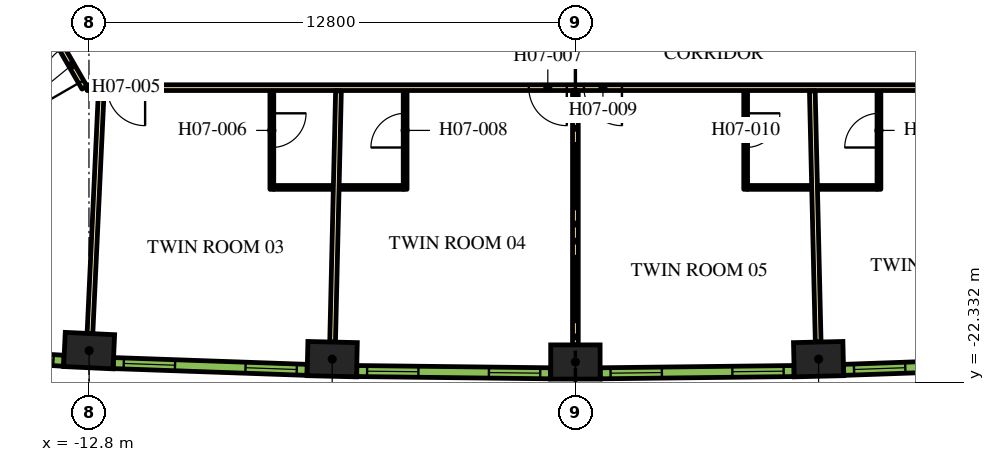
"""IFC4 building model, lengths in metres.
Left out: names, types, materials, properties, quantities, classifications, styles, units other than length and angle.
Written with IfcOpenShell. Run it as: python <this file> out.ifc"""

import sys

from ifc_helpers import new_model, si_unit, direction, frame, frame_2d, origin, origin_2d, place, context, subcontext, project, spatial, rectangle, extrude, element, fill, save


model = new_model("IFC4")
c1 = context("Model", 3, precision=1e-05, world=origin(), true_north=direction((0.0, 1.0)))
c2 = subcontext(c1, "Body", "Model", "MODEL_VIEW")
j1 = project(units=[si_unit("LENGTHUNIT", "METRE"), si_unit("PLANEANGLEUNIT", "RADIAN")], contexts=[c1])
p1 = place(None, origin())
s1 = spatial("IfcSite", under=j1, at=p1, CompositionType="ELEMENT")
p2 = place(p1, origin())
s2 = spatial("IfcBuilding", under=s1, at=p2, CompositionType="ELEMENT")
p3 = place(p2, frame((0.0, 0.0, 99.3)))
s3 = spatial("IfcBuildingStorey", under=s2, at=p3, CompositionType="ELEMENT", Elevation=99.3)
for number, where, z_axis, x_axis in (
    (1, (-12.795, -21.494, 0.0), (0.0, 0.0, 1.0), (0.999, -0.047, 0.0)),
    (2, (-6.399, -21.719, 0.0), (0.0, 0.0, 1.0), (1.0, -0.023, 0.0)),
    (3, (0.0, -21.794, 0.0), (0.0, 0.0, 1.0), (1.0, 0.0, 0.0)),
    (4, (6.399, -21.719, 0.0), (0.0, 0.0, 1.0), (1.0, 0.023, 0.0)),
):
    element("IfcColumn", number, at=place(p3, frame(where, z_axis=z_axis, x_axis=x_axis)), inside=s3, PredefinedType="COLUMN", context=c2, shape_type="SweptSolid", body=[
        extrude(rectangle(XDim=1.3, YDim=0.9, at=origin_2d()), origin(), (0.0, 0.0, 1.0), 3.9),
    ])
p4 = place(p3, frame((-12.918, -14.575, 0.0), z_axis=(0.0, 0.0, 1.0), x_axis=(-0.500009150678, 0.866020120573, 0.0)))
e5 = element("IfcWall", 5, at=p4, inside=s3, PredefinedType="PARTITIONING", context=c2, shape_type="SweptSolid", body=[
    extrude(rectangle(XDim=5.258, YDim=0.15, at=frame_2d((2.629, 0.0))), origin(), (0.0, 0.0, 1.0), 2.75),
])
p5 = place(p4, frame((0.18, 0.0, 0.0)))
e6 = element("IfcOpeningElement", 6, at=p5, cuts=e5, PredefinedType="OPENING", context=c2, shape_type="SweptSolid", body=[
    extrude(rectangle(XDim=1.0, YDim=2.1, at=frame_2d((0.5, 1.05))), frame((0.0, 0.085, 0.0), z_axis=(0.0, -1.0, 0.0), x_axis=(1.0, 0.0, 0.0)), (0.0, 0.0, 1.0), 0.17),
])
p6 = place(p3, frame((12.918, -14.575, 0.0), z_axis=(0.0, 0.0, 1.0), x_axis=(-1.0, 0.0, 0.0)))
e7 = element("IfcWall", 7, at=p6, inside=s3, PredefinedType="PARTITIONING", context=c2, shape_type="SweptSolid", body=[
    extrude(rectangle(XDim=25.766, YDim=0.15, at=frame_2d((12.883, 0.0))), origin(), (0.0, 0.0, 1.0), 2.75),
])
p7 = place(p6, frame((24.24, 0.0, 0.0)))
e8 = element("IfcOpeningElement", 8, at=p7, cuts=e7, PredefinedType="OPENING", context=c2, shape_type="SweptSolid", body=[
    extrude(rectangle(XDim=1.0, YDim=2.1, at=frame_2d((0.5, 1.05))), frame((0.0, 0.085, 0.0), z_axis=(0.0, -1.0, 0.0), x_axis=(1.0, 0.0, 0.0)), (0.0, 0.0, 1.0), 0.17),
])
p8 = place(p6, frame((13.144, 0.0, 0.0)))
e9 = element("IfcOpeningElement", 9, at=p8, cuts=e7, PredefinedType="OPENING", context=c2, shape_type="SweptSolid", body=[
    extrude(rectangle(XDim=1.0, YDim=2.1, at=frame_2d((0.5, 1.05))), frame((0.0, 0.085, 0.0), z_axis=(0.0, -1.0, 0.0), x_axis=(1.0, 0.0, 0.0)), (0.0, 0.0, 1.0), 0.17),
])
p9 = place(p6, frame((11.693, 0.0, 0.0)))
e10 = element("IfcOpeningElement", 10, at=p9, cuts=e7, PredefinedType="OPENING", context=c2, shape_type="SweptSolid", body=[
    extrude(rectangle(XDim=1.0, YDim=2.1, at=frame_2d((0.5, 1.05))), frame((0.0, 0.085, 0.0), z_axis=(0.0, -1.0, 0.0), x_axis=(1.0, 0.0, 0.0)), (0.0, 0.0, 1.0), 0.17),
])
p10 = place(p6, frame((0.596, 0.0, 0.0)))
e11 = element("IfcOpeningElement", 11, at=p10, cuts=e7, PredefinedType="OPENING", context=c2, shape_type="SweptSolid", body=[
    extrude(rectangle(XDim=1.0, YDim=2.1, at=frame_2d((0.5, 1.05))), frame((0.0, 0.085, 0.0), z_axis=(0.0, -1.0, 0.0), x_axis=(1.0, 0.0, 0.0)), (0.0, 0.0, 1.0), 0.17),
])
p11 = place(p3, frame((-12.774, -21.045, 0.0), z_axis=(0.0, 0.0, 1.0), x_axis=(0.046750341626, 0.998906605023, 0.0)))
e12 = element("IfcWall", 12, at=p11, inside=s3, PredefinedType="PARTITIONING", context=c2, shape_type="SweptSolid", body=[
    extrude(rectangle(XDim=6.392, YDim=0.15, at=frame_2d((3.196, 0.0))), origin(), (0.0, 0.0, 1.0), 2.75),
])
p12 = place(p3, frame((-6.389, -21.269, 0.0), z_axis=(0.0, 0.0, 1.0), x_axis=(0.023377429176, 0.999726710559, 0.0)))
e13 = element("IfcWall", 13, at=p12, inside=s3, PredefinedType="PARTITIONING", context=c2, shape_type="SweptSolid", body=[
    extrude(rectangle(XDim=6.611, YDim=0.15, at=frame_2d((3.305, 0.0))), origin(), (0.0, 0.0, 1.0), 2.75),
])
p13 = place(p3, frame((0.0, -21.344, 0.0), z_axis=(0.0, 0.0, 1.0), x_axis=(0.0, 1.0, 0.0)))
e14 = element("IfcWall", 14, at=p13, inside=s3, PredefinedType="PARTITIONING", context=c2, shape_type="SweptSolid", body=[
    extrude(rectangle(XDim=6.694, YDim=0.15, at=frame_2d((3.347, 0.0))), origin(), (0.0, 0.0, 1.0), 2.75),
])
p14 = place(p3, frame((6.389, -21.269, 0.0), z_axis=(0.0, 0.0, 1.0), x_axis=(-0.023377429176, 0.999726710559, 0.0)))
e15 = element("IfcWall", 15, at=p14, inside=s3, PredefinedType="PARTITIONING", context=c2, shape_type="SweptSolid", body=[
    extrude(rectangle(XDim=6.611, YDim=0.15, at=frame_2d((3.305, 0.0))), origin(), (0.0, 0.0, 1.0), 2.75),
])
p15 = place(p3, frame((-7.988, -14.65, 0.0), z_axis=(0.0, 0.0, 1.0), x_axis=(0.0, -1.0, 0.0)))
e16 = element("IfcWall", 16, at=p15, inside=s3, PredefinedType="PARTITIONING", context=c2, shape_type="SweptSolid", body=[
    extrude(rectangle(XDim=2.6, YDim=0.1, at=frame_2d((1.3, 0.0))), origin(), (0.0, 0.0, 1.0), 2.75),
])
p16 = place(p15, frame((0.6, 0.0, 0.0)))
e17 = element("IfcOpeningElement", 17, at=p16, cuts=e16, PredefinedType="OPENING", context=c2, shape_type="SweptSolid", body=[
    extrude(rectangle(XDim=0.9, YDim=2.1, at=frame_2d((0.45, 1.05))), frame((0.0, 0.06, 0.0), z_axis=(0.0, -1.0, 0.0), x_axis=(1.0, 0.0, 0.0)), (0.0, 0.0, 1.0), 0.12),
])
p17 = place(p3, frame((-7.938, -17.2, 0.0), z_axis=(0.0, 0.0, 1.0), x_axis=(1.0, 0.0, 0.0)))
e18 = element("IfcWall", 18, at=p17, inside=s3, PredefinedType="PARTITIONING", context=c2, shape_type="SweptSolid", body=[
    extrude(rectangle(XDim=1.56, YDim=0.1, at=frame_2d((0.78, 0.0))), origin(), (0.0, 0.0, 1.0), 2.75),
])
p18 = place(p3, frame((-4.48, -17.25, 0.0), z_axis=(0.0, 0.0, 1.0), x_axis=(0.0, 1.0, 0.0)))
e19 = element("IfcWall", 19, at=p18, inside=s3, PredefinedType="PARTITIONING", context=c2, shape_type="SweptSolid", body=[
    extrude(rectangle(XDim=2.6, YDim=0.1, at=frame_2d((1.3, 0.0))), origin(), (0.0, 0.0, 1.0), 2.75),
])
p19 = place(p18, frame((1.1, 0.0, 0.0)))
e20 = element("IfcOpeningElement", 20, at=p19, cuts=e19, PredefinedType="OPENING", context=c2, shape_type="SweptSolid", body=[
    extrude(rectangle(XDim=0.9, YDim=2.1, at=frame_2d((0.45, 1.05))), frame((0.0, 0.06, 0.0), z_axis=(0.0, -1.0, 0.0), x_axis=(1.0, 0.0, 0.0)), (0.0, 0.0, 1.0), 0.12),
])
p20 = place(p3, frame((-4.53, -17.2, 0.0), z_axis=(0.0, 0.0, 1.0), x_axis=(-1.0, 0.0, 0.0)))
e21 = element("IfcWall", 21, at=p20, inside=s3, PredefinedType="PARTITIONING", context=c2, shape_type="SweptSolid", body=[
    extrude(rectangle(XDim=1.68, YDim=0.1, at=frame_2d((0.84, 0.0))), origin(), (0.0, 0.0, 1.0), 2.75),
])
p21 = place(p3, frame((4.48, -14.65, 0.0), z_axis=(0.0, 0.0, 1.0), x_axis=(0.0, -1.0, 0.0)))
e22 = element("IfcWall", 22, at=p21, inside=s3, PredefinedType="PARTITIONING", context=c2, shape_type="SweptSolid", body=[
    extrude(rectangle(XDim=2.6, YDim=0.1, at=frame_2d((1.3, 0.0))), origin(), (0.0, 0.0, 1.0), 2.75),
])
p22 = place(p21, frame((0.6, 0.0, 0.0)))
e23 = element("IfcOpeningElement", 23, at=p22, cuts=e22, PredefinedType="OPENING", context=c2, shape_type="SweptSolid", body=[
    extrude(rectangle(XDim=0.9, YDim=2.1, at=frame_2d((0.45, 1.05))), frame((0.0, 0.06, 0.0), z_axis=(0.0, -1.0, 0.0), x_axis=(1.0, 0.0, 0.0)), (0.0, 0.0, 1.0), 0.12),
])
p23 = place(p3, frame((4.53, -17.2, 0.0), z_axis=(0.0, 0.0, 1.0), x_axis=(1.0, 0.0, 0.0)))
e24 = element("IfcWall", 24, at=p23, inside=s3, PredefinedType="PARTITIONING", context=c2, shape_type="SweptSolid", body=[
    extrude(rectangle(XDim=1.68, YDim=0.1, at=frame_2d((0.84, 0.0))), origin(), (0.0, 0.0, 1.0), 2.75),
])
p24 = place(p3, frame((7.988, -17.25, 0.0), z_axis=(0.0, 0.0, 1.0), x_axis=(0.0, 1.0, 0.0)))
e25 = element("IfcWall", 25, at=p24, inside=s3, PredefinedType="PARTITIONING", context=c2, shape_type="SweptSolid", body=[
    extrude(rectangle(XDim=2.6, YDim=0.1, at=frame_2d((1.3, 0.0))), origin(), (0.0, 0.0, 1.0), 2.75),
])
p25 = place(p24, frame((1.1, 0.0, 0.0)))
e26 = element("IfcOpeningElement", 26, at=p25, cuts=e25, PredefinedType="OPENING", context=c2, shape_type="SweptSolid", body=[
    extrude(rectangle(XDim=0.9, YDim=2.1, at=frame_2d((0.45, 1.05))), frame((0.0, 0.06, 0.0), z_axis=(0.0, -1.0, 0.0), x_axis=(1.0, 0.0, 0.0)), (0.0, 0.0, 1.0), 0.12),
])
p26 = place(p3, frame((7.938, -17.2, 0.0), z_axis=(0.0, 0.0, 1.0), x_axis=(-1.0, 0.0, 0.0)))
e27 = element("IfcWall", 27, at=p26, inside=s3, PredefinedType="PARTITIONING", context=c2, shape_type="SweptSolid", body=[
    extrude(rectangle(XDim=1.56, YDim=0.1, at=frame_2d((0.78, 0.0))), origin(), (0.0, 0.0, 1.0), 2.75),
])
p27 = place(p3, frame((-18.553, -21.463, 0.0), z_axis=(0.0, 0.0, 1.0), x_axis=(0.998290511436, -0.058447025388, 0.0)))
e28 = element("IfcWall", 28, at=p27, inside=s3, PredefinedType="SOLIDWALL", context=c2, shape_type="SweptSolid", body=[
    extrude(rectangle(XDim=5.1, YDim=0.29, at=frame_2d((2.55, 0.0))), origin(), (0.0, 0.0, 1.0), 3.65),
])
p28 = place(p27, frame((0.273, 0.0, 0.9)))
e29 = element("IfcOpeningElement", 29, at=p28, cuts=e28, PredefinedType="OPENING", context=c2, shape_type="SweptSolid", body=[
    extrude(rectangle(XDim=1.35, YDim=2.15, at=frame_2d((0.675, 1.075))), frame((0.0, 0.155, 0.0), z_axis=(0.0, -1.0, 0.0), x_axis=(1.0, 0.0, 0.0)), (0.0, 0.0, 1.0), 0.31),
])
p29 = place(p27, frame((3.478, 0.0, 0.9)))
e30 = element("IfcOpeningElement", 30, at=p29, cuts=e28, PredefinedType="OPENING", context=c2, shape_type="SweptSolid", body=[
    extrude(rectangle(XDim=1.35, YDim=2.15, at=frame_2d((0.675, 1.075))), frame((0.0, 0.155, 0.0), z_axis=(0.0, -1.0, 0.0), x_axis=(1.0, 0.0, 0.0)), (0.0, 0.0, 1.0), 0.31),
])
p30 = place(p3, frame((-12.157, -21.822, 0.0), z_axis=(0.0, 0.0, 1.0), x_axis=(0.999385993957, -0.035037623812, 0.0)))
e31 = element("IfcWall", 31, at=p30, inside=s3, PredefinedType="SOLIDWALL", context=c2, shape_type="SweptSolid", body=[
    extrude(rectangle(XDim=5.101, YDim=0.29, at=frame_2d((2.55, 0.0))), origin(), (0.0, 0.0, 1.0), 3.65),
])
p31 = place(p30, frame((0.273, 0.0, 0.9)))
e32 = element("IfcOpeningElement", 32, at=p31, cuts=e31, PredefinedType="OPENING", context=c2, shape_type="SweptSolid", body=[
    extrude(rectangle(XDim=1.35, YDim=2.15, at=frame_2d((0.675, 1.075))), frame((0.0, 0.155, 0.0), z_axis=(0.0, -1.0, 0.0), x_axis=(1.0, 0.0, 0.0)), (0.0, 0.0, 1.0), 0.31),
])
p32 = place(p30, frame((3.478, 0.0, 0.9)))
e33 = element("IfcOpeningElement", 33, at=p32, cuts=e31, PredefinedType="OPENING", context=c2, shape_type="SweptSolid", body=[
    extrude(rectangle(XDim=1.35, YDim=2.15, at=frame_2d((0.675, 1.075))), frame((0.0, 0.155, 0.0), z_axis=(0.0, -1.0, 0.0), x_axis=(1.0, 0.0, 0.0)), (0.0, 0.0, 1.0), 0.31),
])
p33 = place(p3, frame((-5.753, -22.031, 0.0), z_axis=(0.0, 0.0, 1.0), x_axis=(0.999931786565, -0.011679992145, 0.0)))
e34 = element("IfcWall", 34, at=p33, inside=s3, PredefinedType="SOLIDWALL", context=c2, shape_type="SweptSolid", body=[
    extrude(rectangle(XDim=5.1, YDim=0.29, at=frame_2d((2.55, 0.0))), origin(), (0.0, 0.0, 1.0), 3.65),
])
p34 = place(p33, frame((0.272, 0.0, 0.9)))
e35 = element("IfcOpeningElement", 35, at=p34, cuts=e34, PredefinedType="OPENING", context=c2, shape_type="SweptSolid", body=[
    extrude(rectangle(XDim=1.35, YDim=2.15, at=frame_2d((0.675, 1.075))), frame((0.0, 0.155, 0.0), z_axis=(0.0, -1.0, 0.0), x_axis=(1.0, 0.0, 0.0)), (0.0, 0.0, 1.0), 0.31),
])
p35 = place(p33, frame((3.478, 0.0, 0.9)))
e36 = element("IfcOpeningElement", 36, at=p35, cuts=e34, PredefinedType="OPENING", context=c2, shape_type="SweptSolid", body=[
    extrude(rectangle(XDim=1.35, YDim=2.15, at=frame_2d((0.675, 1.075))), frame((0.0, 0.155, 0.0), z_axis=(0.0, -1.0, 0.0), x_axis=(1.0, 0.0, 0.0)), (0.0, 0.0, 1.0), 0.31),
])
p36 = place(p3, frame((0.653, -22.091, 0.0), z_axis=(0.0, 0.0, 1.0), x_axis=(0.999931786565, 0.011679992145, 0.0)))
e37 = element("IfcWall", 37, at=p36, inside=s3, PredefinedType="SOLIDWALL", context=c2, shape_type="SweptSolid", body=[
    extrude(rectangle(XDim=5.1, YDim=0.29, at=frame_2d((2.55, 0.0))), origin(), (0.0, 0.0, 1.0), 3.65),
])
p37 = place(p36, frame((0.273, 0.0, 0.9)))
e38 = element("IfcOpeningElement", 38, at=p37, cuts=e37, PredefinedType="OPENING", context=c2, shape_type="SweptSolid", body=[
    extrude(rectangle(XDim=1.35, YDim=2.15, at=frame_2d((0.675, 1.075))), frame((0.0, 0.155, 0.0), z_axis=(0.0, -1.0, 0.0), x_axis=(1.0, 0.0, 0.0)), (0.0, 0.0, 1.0), 0.31),
])
p38 = place(p36, frame((3.478, 0.0, 0.9)))
e39 = element("IfcOpeningElement", 39, at=p38, cuts=e37, PredefinedType="OPENING", context=c2, shape_type="SweptSolid", body=[
    extrude(rectangle(XDim=1.35, YDim=2.15, at=frame_2d((0.675, 1.075))), frame((0.0, 0.155, 0.0), z_axis=(0.0, -1.0, 0.0), x_axis=(1.0, 0.0, 0.0)), (0.0, 0.0, 1.0), 0.31),
])
p39 = place(p3, frame((7.059, -22.001, 0.0), z_axis=(0.0, 0.0, 1.0), x_axis=(0.999385993957, 0.035037623812, 0.0)))
e40 = element("IfcWall", 40, at=p39, inside=s3, PredefinedType="SOLIDWALL", context=c2, shape_type="SweptSolid", body=[
    extrude(rectangle(XDim=5.101, YDim=0.29, at=frame_2d((2.55, 0.0))), origin(), (0.0, 0.0, 1.0), 3.65),
])
p40 = place(p39, frame((0.273, 0.0, 0.9)))
e41 = element("IfcOpeningElement", 41, at=p40, cuts=e40, PredefinedType="OPENING", context=c2, shape_type="SweptSolid", body=[
    extrude(rectangle(XDim=1.35, YDim=2.15, at=frame_2d((0.675, 1.075))), frame((0.0, 0.155, 0.0), z_axis=(0.0, -1.0, 0.0), x_axis=(1.0, 0.0, 0.0)), (0.0, 0.0, 1.0), 0.31),
])
p41 = place(p39, frame((3.478, 0.0, 0.9)))
e42 = element("IfcOpeningElement", 42, at=p41, cuts=e40, PredefinedType="OPENING", context=c2, shape_type="SweptSolid", body=[
    extrude(rectangle(XDim=1.35, YDim=2.15, at=frame_2d((0.675, 1.075))), frame((0.0, 0.155, 0.0), z_axis=(0.0, -1.0, 0.0), x_axis=(1.0, 0.0, 0.0)), (0.0, 0.0, 1.0), 0.31),
])
p42 = place(p5, origin())
e43 = element("IfcDoor", 43, at=p42, inside=s3, OperationType="SINGLE_SWING_LEFT", PredefinedType="DOOR", context=c2, shape_type="SweptSolid", body=[
    extrude(rectangle(XDim=1.0, YDim=2.1, at=frame_2d((0.5, 1.05))), frame((0.0, 0.025, 0.0), z_axis=(0.0, -1.0, 0.0), x_axis=(1.0, 0.0, 0.0)), (0.0, 0.0, 1.0), 0.05),
])
fill(e6, e43)
p43 = place(p7, origin())
e44 = element("IfcDoor", 44, at=p43, inside=s3, OperationType="SINGLE_SWING_RIGHT", PredefinedType="DOOR", context=c2, shape_type="SweptSolid", body=[
    extrude(rectangle(XDim=1.0, YDim=2.1, at=frame_2d((0.5, 1.05))), frame((0.0, 0.025, 0.0), z_axis=(0.0, -1.0, 0.0), x_axis=(1.0, 0.0, 0.0)), (0.0, 0.0, 1.0), 0.05),
])
fill(e8, e44)
p44 = place(p16, origin())
e45 = element("IfcDoor", 45, at=p44, inside=s3, OperationType="SINGLE_SWING_RIGHT", PredefinedType="DOOR", context=c2, shape_type="SweptSolid", body=[
    extrude(rectangle(XDim=0.9, YDim=2.1, at=frame_2d((0.45, 1.05))), frame((0.0, 0.025, 0.0), z_axis=(0.0, -1.0, 0.0), x_axis=(1.0, 0.0, 0.0)), (0.0, 0.0, 1.0), 0.05),
])
fill(e17, e45)
p45 = place(p8, origin())
e46 = element("IfcDoor", 46, at=p45, inside=s3, OperationType="SINGLE_SWING_LEFT", PredefinedType="DOOR", context=c2, shape_type="SweptSolid", body=[
    extrude(rectangle(XDim=1.0, YDim=2.1, at=frame_2d((0.5, 1.05))), frame((0.0, 0.025, 0.0), z_axis=(0.0, -1.0, 0.0), x_axis=(1.0, 0.0, 0.0)), (0.0, 0.0, 1.0), 0.05),
])
fill(e9, e46)
p46 = place(p19, origin())
e47 = element("IfcDoor", 47, at=p46, inside=s3, OperationType="SINGLE_SWING_LEFT", PredefinedType="DOOR", context=c2, shape_type="SweptSolid", body=[
    extrude(rectangle(XDim=0.9, YDim=2.1, at=frame_2d((0.45, 1.05))), frame((0.0, 0.025, 0.0), z_axis=(0.0, -1.0, 0.0), x_axis=(1.0, 0.0, 0.0)), (0.0, 0.0, 1.0), 0.05),
])
fill(e20, e47)
p47 = place(p9, origin())
e48 = element("IfcDoor", 48, at=p47, inside=s3, OperationType="SINGLE_SWING_RIGHT", PredefinedType="DOOR", context=c2, shape_type="SweptSolid", body=[
    extrude(rectangle(XDim=1.0, YDim=2.1, at=frame_2d((0.5, 1.05))), frame((0.0, 0.025, 0.0), z_axis=(0.0, -1.0, 0.0), x_axis=(1.0, 0.0, 0.0)), (0.0, 0.0, 1.0), 0.05),
])
fill(e10, e48)
p48 = place(p22, origin())
e49 = element("IfcDoor", 49, at=p48, inside=s3, OperationType="SINGLE_SWING_LEFT", PredefinedType="DOOR", context=c2, shape_type="SweptSolid", body=[
    extrude(rectangle(XDim=0.9, YDim=2.1, at=frame_2d((0.45, 1.05))), frame((0.0, 0.025, 0.0), z_axis=(0.0, -1.0, 0.0), x_axis=(1.0, 0.0, 0.0)), (0.0, 0.0, 1.0), 0.05),
])
fill(e23, e49)
p49 = place(p25, origin())
e50 = element("IfcDoor", 50, at=p49, inside=s3, OperationType="SINGLE_SWING_RIGHT", PredefinedType="DOOR", context=c2, shape_type="SweptSolid", body=[
    extrude(rectangle(XDim=0.9, YDim=2.1, at=frame_2d((0.45, 1.05))), frame((0.0, 0.025, 0.0), z_axis=(0.0, -1.0, 0.0), x_axis=(1.0, 0.0, 0.0)), (0.0, 0.0, 1.0), 0.05),
])
fill(e26, e50)
p50 = place(p29, origin())
e51 = element("IfcWindow", 51, at=p50, inside=s3, PartitioningType="DOUBLE_PANEL_VERTICAL", PredefinedType="WINDOW", context=c2, shape_type="SweptSolid", body=[
    extrude(rectangle(XDim=1.35, YDim=2.15, at=frame_2d((0.675, 1.075))), frame((0.0, 0.015, 0.0), z_axis=(0.0, -1.0, 0.0), x_axis=(1.0, 0.0, 0.0)), (0.0, 0.0, 1.0), 0.06),
])
fill(e30, e51)
p51 = place(p31, origin())
e52 = element("IfcWindow", 52, at=p51, inside=s3, PartitioningType="DOUBLE_PANEL_VERTICAL", PredefinedType="WINDOW", context=c2, shape_type="SweptSolid", body=[
    extrude(rectangle(XDim=1.35, YDim=2.15, at=frame_2d((0.675, 1.075))), frame((0.0, 0.015, 0.0), z_axis=(0.0, -1.0, 0.0), x_axis=(1.0, 0.0, 0.0)), (0.0, 0.0, 1.0), 0.06),
])
fill(e32, e52)
p52 = place(p32, origin())
e53 = element("IfcWindow", 53, at=p52, inside=s3, PartitioningType="DOUBLE_PANEL_VERTICAL", PredefinedType="WINDOW", context=c2, shape_type="SweptSolid", body=[
    extrude(rectangle(XDim=1.35, YDim=2.15, at=frame_2d((0.675, 1.075))), frame((0.0, 0.015, 0.0), z_axis=(0.0, -1.0, 0.0), x_axis=(1.0, 0.0, 0.0)), (0.0, 0.0, 1.0), 0.06),
])
fill(e33, e53)
p53 = place(p34, origin())
e54 = element("IfcWindow", 54, at=p53, inside=s3, PartitioningType="DOUBLE_PANEL_VERTICAL", PredefinedType="WINDOW", context=c2, shape_type="SweptSolid", body=[
    extrude(rectangle(XDim=1.35, YDim=2.15, at=frame_2d((0.675, 1.075))), frame((0.0, 0.015, 0.0), z_axis=(0.0, -1.0, 0.0), x_axis=(1.0, 0.0, 0.0)), (0.0, 0.0, 1.0), 0.06),
])
fill(e35, e54)
p54 = place(p35, origin())
e55 = element("IfcWindow", 55, at=p54, inside=s3, PartitioningType="DOUBLE_PANEL_VERTICAL", PredefinedType="WINDOW", context=c2, shape_type="SweptSolid", body=[
    extrude(rectangle(XDim=1.35, YDim=2.15, at=frame_2d((0.675, 1.075))), frame((0.0, 0.015, 0.0), z_axis=(0.0, -1.0, 0.0), x_axis=(1.0, 0.0, 0.0)), (0.0, 0.0, 1.0), 0.06),
])
fill(e36, e55)
p55 = place(p37, origin())
e56 = element("IfcWindow", 56, at=p55, inside=s3, PartitioningType="DOUBLE_PANEL_VERTICAL", PredefinedType="WINDOW", context=c2, shape_type="SweptSolid", body=[
    extrude(rectangle(XDim=1.35, YDim=2.15, at=frame_2d((0.675, 1.075))), frame((0.0, 0.015, 0.0), z_axis=(0.0, -1.0, 0.0), x_axis=(1.0, 0.0, 0.0)), (0.0, 0.0, 1.0), 0.06),
])
fill(e38, e56)
p56 = place(p38, origin())
e57 = element("IfcWindow", 57, at=p56, inside=s3, PartitioningType="DOUBLE_PANEL_VERTICAL", PredefinedType="WINDOW", context=c2, shape_type="SweptSolid", body=[
    extrude(rectangle(XDim=1.35, YDim=2.15, at=frame_2d((0.675, 1.075))), frame((0.0, 0.015, 0.0), z_axis=(0.0, -1.0, 0.0), x_axis=(1.0, 0.0, 0.0)), (0.0, 0.0, 1.0), 0.06),
])
fill(e39, e57)
p57 = place(p40, origin())
e58 = element("IfcWindow", 58, at=p57, inside=s3, PartitioningType="DOUBLE_PANEL_VERTICAL", PredefinedType="WINDOW", context=c2, shape_type="SweptSolid", body=[
    extrude(rectangle(XDim=1.35, YDim=2.15, at=frame_2d((0.675, 1.075))), frame((0.0, 0.015, 0.0), z_axis=(0.0, -1.0, 0.0), x_axis=(1.0, 0.0, 0.0)), (0.0, 0.0, 1.0), 0.06),
])
fill(e41, e58)
save(model, sys.argv[1])
